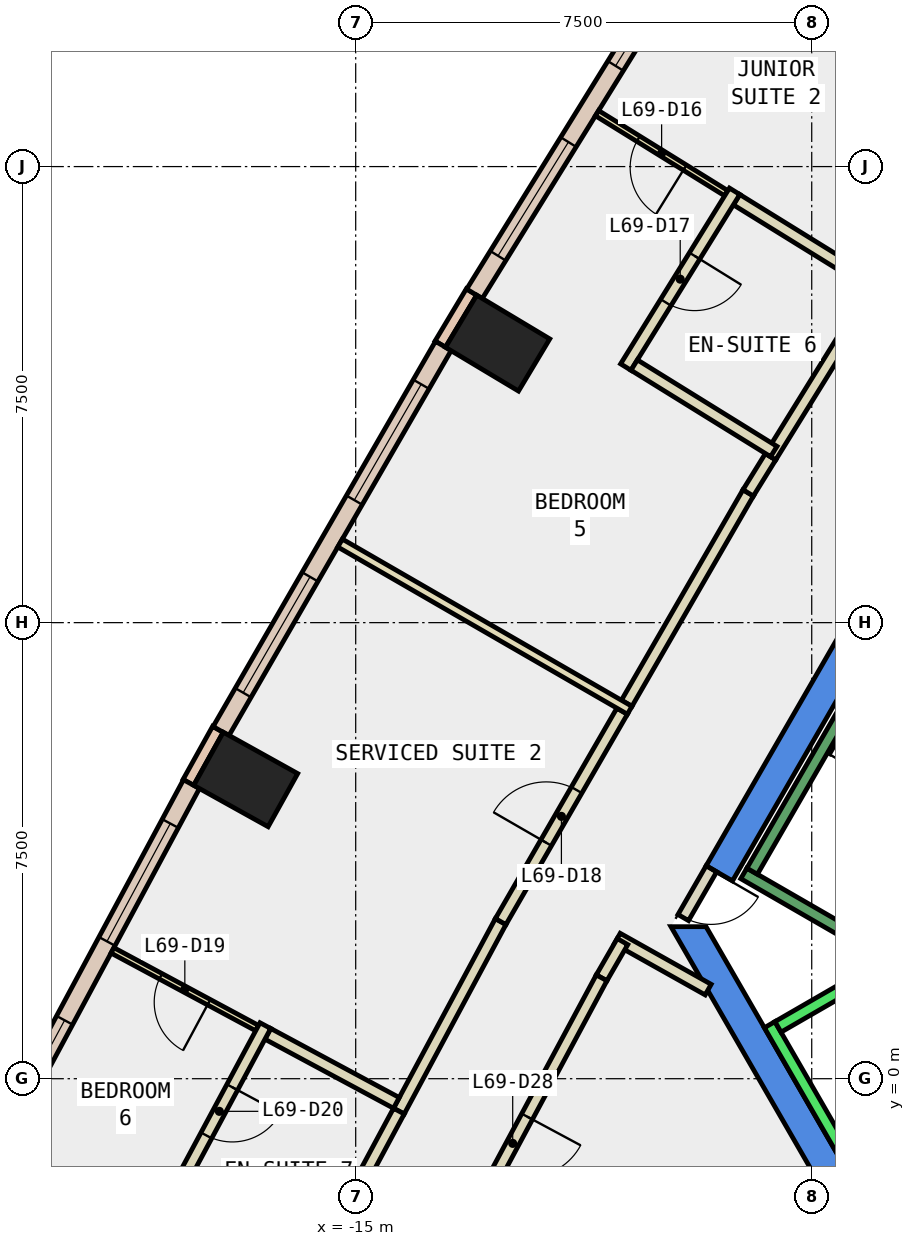
"""IFC4 building model, lengths in metres.
Left out: names, types, materials, properties, quantities, classifications, styles, units other than length and angle.
Written with IfcOpenShell. Run it as: python <this file> out.ifc"""

import sys

from ifc_helpers import new_model, si_unit, direction, frame, frame_2d, origin, origin_2d, place, context, subcontext, project, spatial, polyline, rectangle, outline, extrude, element, fill, save


model = new_model("IFC4")
c1 = context("Model", 3, precision=1e-05, world=origin(), true_north=direction((0.0, 1.0)))
c2 = subcontext(c1, "Body", "Model", "MODEL_VIEW")
j1 = project(units=[si_unit("LENGTHUNIT", "METRE"), si_unit("PLANEANGLEUNIT", "RADIAN")], contexts=[c1])
p1 = place(None, origin())
s1 = spatial("IfcSite", under=j1, at=p1, CompositionType="ELEMENT")
p2 = place(p1, origin())
s2 = spatial("IfcBuilding", under=s1, at=p2, CompositionType="ELEMENT")
p3 = place(p2, frame((0.0, 0.0, 297.2)))
s3 = spatial("IfcBuildingStorey", under=s2, at=p3, CompositionType="ELEMENT", Elevation=297.2)
for number, where, z_axis, x_axis in (
    (1, (-12.666, 12.097, -0.34), (0.0, 0.0, 1.0), (0.514, 0.858, 0.0)),
    (2, (-16.809, 4.921, -0.34), (0.0, 0.0, 1.0), (0.486, 0.874, 0.0)),
):
    element("IfcColumn", number, at=place(p3, frame(where, z_axis=z_axis, x_axis=x_axis)), inside=s3, PredefinedType="COLUMN", context=c2, shape_type="SweptSolid", body=[
        extrude(rectangle(XDim=1.0, YDim=1.4, at=origin_2d()), origin(), (0.0, 0.0, 1.0), 3.6),
    ])
p4 = place(p3, frame((0.0, 0.0, -0.34)))
e3 = element("IfcWall", 3, at=p4, inside=s3, PredefinedType="SHEAR", context=c2, shape_type="SweptSolid", body=[
    extrude(outline(polyline([(-9.236, 3.502), (-8.803, 3.253), (-4.619, 10.5), (-4.907, 11.0), (-9.236, 3.502)])), origin(), (0.0, 0.0, 1.0), 3.6),
])
p5 = place(p3, frame((0.0, 0.0, -0.34)))
e4 = element("IfcWall", 4, at=p5, inside=s3, PredefinedType="SHEAR", context=c2, shape_type="SweptSolid", body=[
    extrude(outline(polyline([(-9.815, 2.5), (-4.907, -6.0), (-4.619, -5.5), (-9.238, 2.5), (-9.815, 2.5)])), origin(), (0.0, 0.0, 1.0), 3.6),
])
for number, where, z_axis, x_axis in (
    (5, (-13.095, 12.938, 0.0), (0.0, 0.0, 1.0), (-0.514, -0.858, 0.0)),
    (6, (-17.266, 5.746, 0.0), (0.0, 0.0, 1.0), (-0.486, -0.874, 0.0)),
):
    element("IfcWall", number, at=place(p3, frame(where, z_axis=z_axis, x_axis=x_axis)), inside=s3, PredefinedType="STANDARD", context=c2, shape_type="SweptSolid", body=[
        extrude(rectangle(XDim=1.0, YDim=0.2, at=frame_2d((0.5, 0.0))), origin(), (0.0, 0.0, 1.0), 3.26),
    ])
p6 = place(p3, frame((-9.18, 19.153, 0.0), z_axis=(0.0, 0.0, 1.0), x_axis=(-0.526409529565, -0.850231149267, 0.0)))
e7 = element("IfcWall", 7, at=p6, inside=s3, PredefinedType="STANDARD", context=c2, shape_type="SweptSolid", body=[
    extrude(rectangle(XDim=7.346, YDim=0.3, at=frame_2d((3.673, 0.0))), origin(), (0.0, 0.0, 1.0), 3.26),
])
p7 = place(p6, frame((0.737, 0.0, 0.9)))
e8 = element("IfcOpeningElement", 8, at=p7, cuts=e7, PredefinedType="OPENING", context=c2, shape_type="SweptSolid", body=[
    extrude(rectangle(XDim=2.2, YDim=2.0, at=frame_2d((1.1, 1.0))), frame((0.0, 0.16, 0.0), z_axis=(0.0, -1.0, 0.0), x_axis=(1.0, 0.0, 0.0)), (0.0, 0.0, 1.0), 0.32),
])
p8 = place(p6, frame((4.41, 0.0, 0.9)))
e9 = element("IfcOpeningElement", 9, at=p8, cuts=e7, PredefinedType="OPENING", context=c2, shape_type="SweptSolid", body=[
    extrude(rectangle(XDim=2.2, YDim=2.0, at=frame_2d((1.1, 1.0))), frame((0.0, 0.16, 0.0), z_axis=(0.0, -1.0, 0.0), x_axis=(1.0, 0.0, 0.0)), (0.0, 0.0, 1.0), 0.32),
])
p9 = place(p3, frame((-13.559, 12.051, 0.0), z_axis=(0.0, 0.0, 1.0), x_axis=(-0.499905472729, -0.866079972252, 0.0)))
e10 = element("IfcWall", 10, at=p9, inside=s3, PredefinedType="STANDARD", context=c2, shape_type="SweptSolid", body=[
    extrude(rectangle(XDim=7.313, YDim=0.3, at=frame_2d((3.657, 0.0))), origin(), (0.0, 0.0, 1.0), 3.26),
])
p10 = place(p9, frame((0.728, 0.0, 0.9)))
e11 = element("IfcOpeningElement", 11, at=p10, cuts=e10, PredefinedType="OPENING", context=c2, shape_type="SweptSolid", body=[
    extrude(rectangle(XDim=2.2, YDim=2.0, at=frame_2d((1.1, 1.0))), frame((0.0, 0.16, 0.0), z_axis=(0.0, -1.0, 0.0), x_axis=(1.0, 0.0, 0.0)), (0.0, 0.0, 1.0), 0.32),
])
p11 = place(p9, frame((4.385, 0.0, 0.9)))
e12 = element("IfcOpeningElement", 12, at=p11, cuts=e10, PredefinedType="OPENING", context=c2, shape_type="SweptSolid", body=[
    extrude(rectangle(XDim=2.2, YDim=2.0, at=frame_2d((1.1, 1.0))), frame((0.0, 0.16, 0.0), z_axis=(0.0, -1.0, 0.0), x_axis=(1.0, 0.0, 0.0)), (0.0, 0.0, 1.0), 0.32),
])
p12 = place(p3, frame((-17.701, 4.845, 0.0), z_axis=(0.0, 0.0, 1.0), x_axis=(-0.473225522632, -0.880941317415, 0.0)))
e13 = element("IfcWall", 13, at=p12, inside=s3, PredefinedType="STANDARD", context=c2, shape_type="SweptSolid", body=[
    extrude(rectangle(XDim=7.345, YDim=0.3, at=frame_2d((3.673, 0.0))), origin(), (0.0, 0.0, 1.0), 3.26),
])
p13 = place(p12, frame((0.736, 0.0, 0.9)))
e14 = element("IfcOpeningElement", 14, at=p13, cuts=e13, PredefinedType="OPENING", context=c2, shape_type="SweptSolid", body=[
    extrude(rectangle(XDim=2.2, YDim=2.0, at=frame_2d((1.1, 1.0))), frame((0.0, 0.16, 0.0), z_axis=(0.0, -1.0, 0.0), x_axis=(1.0, 0.0, 0.0)), (0.0, 0.0, 1.0), 0.32),
])
p14 = place(p12, frame((4.409, 0.0, 0.9)))
e15 = element("IfcOpeningElement", 15, at=p14, cuts=e13, PredefinedType="OPENING", context=c2, shape_type="SweptSolid", body=[
    extrude(rectangle(XDim=2.2, YDim=2.0, at=frame_2d((1.1, 1.0))), frame((0.0, 0.16, 0.0), z_axis=(0.0, -1.0, 0.0), x_axis=(1.0, 0.0, 0.0)), (0.0, 0.0, 1.0), 0.32),
])
p15 = place(p3, frame((-9.203, 1.465, 0.0), z_axis=(0.0, 0.0, 1.0), x_axis=(-0.872243753731, 0.489071399775, 0.0)))
e16 = element("IfcWall", 16, at=p15, inside=s3, PredefinedType="PARTITIONING", context=c2, shape_type="SweptSolid", body=[
    extrude(rectangle(XDim=1.715, YDim=0.2, at=frame_2d((0.858, 0.0))), origin(), (0.0, 0.0, 1.0), 3.26),
])
p16 = place(p3, frame((-10.612, 2.255, 0.0), z_axis=(0.0, 0.0, 1.0), x_axis=(-0.499916971989, -0.866073334723, 0.0)))
e17 = element("IfcWall", 17, at=p16, inside=s3, PredefinedType="PARTITIONING", context=c2, shape_type="SweptSolid", body=[
    extrude(rectangle(XDim=0.688, YDim=0.2, at=frame_2d((0.344, 0.0))), origin(), (0.0, 0.0, 1.0), 3.26),
])
p17 = place(p3, frame((-10.956, 1.659, 0.0), z_axis=(0.0, 0.0, 1.0), x_axis=(-0.473095976848, -0.881010894762, 0.0)))
e18 = element("IfcWall", 18, at=p17, inside=s3, PredefinedType="PARTITIONING", context=c2, shape_type="SweptSolid", body=[
    extrude(rectangle(XDim=6.18, YDim=0.2, at=frame_2d((3.09, 0.0))), origin(), (0.0, 0.0, 1.0), 3.26),
])
p18 = place(p17, frame((2.59, 0.0, 0.0)))
e19 = element("IfcOpeningElement", 19, at=p18, cuts=e18, PredefinedType="OPENING", context=c2, shape_type="SweptSolid", body=[
    extrude(rectangle(XDim=1.0, YDim=2.1, at=frame_2d((0.5, 1.05))), frame((0.0, 0.11, 0.0), z_axis=(0.0, -1.0, 0.0), x_axis=(1.0, 0.0, 0.0)), (0.0, 0.0, 1.0), 0.22),
])
p19 = place(p3, frame((-10.543, 6.174, 0.0), z_axis=(0.0, 0.0, 1.0), x_axis=(0.50008212199, 0.86597798544, 0.0)))
e20 = element("IfcWall", 20, at=p19, inside=s3, PredefinedType="PARTITIONING", context=c2, shape_type="SweptSolid", body=[
    extrude(rectangle(XDim=3.995, YDim=0.2, at=frame_2d((1.998, 0.0))), origin(), (0.0, 0.0, 1.0), 3.26),
])
p20 = place(p3, frame((-8.545, 9.634, 0.0), z_axis=(0.0, 0.0, 1.0), x_axis=(0.52594604986, 0.85051793199, 0.0)))
e21 = element("IfcWall", 21, at=p20, inside=s3, PredefinedType="PARTITIONING", context=c2, shape_type="SweptSolid", body=[
    extrude(rectangle(XDim=0.699, YDim=0.2, at=frame_2d((0.35, 0.0))), origin(), (0.0, 0.0, 1.0), 3.26),
])
p21 = place(p3, frame((-8.177, 10.229, 0.0), z_axis=(0.0, 0.0, 1.0), x_axis=(0.526504295939, 0.850172468595, 0.0)))
e22 = element("IfcWall", 22, at=p21, inside=s3, PredefinedType="PARTITIONING", context=c2, shape_type="SweptSolid", body=[
    extrude(rectangle(XDim=3.2, YDim=0.2, at=frame_2d((1.6, 0.0))), origin(), (0.0, 0.0, 1.0), 3.26),
])
p22 = place(p3, frame((-14.29, -0.533, 0.0), z_axis=(0.0, 0.0, 1.0), x_axis=(0.473161350875, 0.880975786295, 0.0)))
e23 = element("IfcWall", 23, at=p22, inside=s3, PredefinedType="PARTITIONING", context=c2, shape_type="SweptSolid", body=[
    extrude(rectangle(XDim=3.538, YDim=0.2, at=frame_2d((1.769, 0.0))), origin(), (0.0, 0.0, 1.0), 3.26),
])
p23 = place(p3, frame((-12.616, 2.584, 0.0), z_axis=(0.0, 0.0, 1.0), x_axis=(0.50008212199, 0.86597798544, 0.0)))
e24 = element("IfcWall", 24, at=p23, inside=s3, PredefinedType="PARTITIONING", context=c2, shape_type="SweptSolid", body=[
    extrude(rectangle(XDim=3.995, YDim=0.2, at=frame_2d((1.998, 0.0))), origin(), (0.0, 0.0, 1.0), 3.26),
])
p24 = place(p23, frame((1.498, 0.0, 0.0)))
e25 = element("IfcOpeningElement", 25, at=p24, cuts=e24, PredefinedType="OPENING", context=c2, shape_type="SweptSolid", body=[
    extrude(rectangle(XDim=1.0, YDim=2.1, at=frame_2d((0.5, 1.05))), frame((0.0, 0.11, 0.0), z_axis=(0.0, -1.0, 0.0), x_axis=(1.0, 0.0, 0.0)), (0.0, 0.0, 1.0), 0.22),
])
p25 = place(p3, frame((-15.71, -3.176, 0.0), z_axis=(0.0, 0.0, 1.0), x_axis=(0.473255284848, 0.880925329051, 0.0)))
e26 = element("IfcWall", 26, at=p25, inside=s3, PredefinedType="PARTITIONING", context=c2, shape_type="SweptSolid", body=[
    extrude(rectangle(XDim=3.0, YDim=0.2, at=frame_2d((1.5, 0.0))), origin(), (0.0, 0.0, 1.0), 3.26),
])
p26 = place(p3, frame((-4.445, 16.068, 0.0), z_axis=(0.0, 0.0, 1.0), x_axis=(-0.785872006963, 0.618389188677, 0.0)))
e27 = element("IfcWall", 27, at=p26, inside=s3, PredefinedType="PARTITIONING", context=c2, shape_type="SweptSolid", body=[
    extrude(rectangle(XDim=4.216, YDim=0.15, at=frame_2d((2.108, 0.0))), origin(), (0.0, 0.0, 1.0), 3.26),
])
p27 = place(p3, frame((-8.906, 14.562, 0.0), z_axis=(0.0, 0.0, 1.0), x_axis=(-0.850186034224, 0.526482390219, 0.0)))
e28 = element("IfcWall", 28, at=p27, inside=s3, PredefinedType="PARTITIONING", context=c2, shape_type="SweptSolid", body=[
    extrude(rectangle(XDim=2.5, YDim=0.1, at=frame_2d((1.25, 0.0))), origin(), (0.0, 0.0, 1.0), 3.26),
])
p28 = place(p27, frame((0.8, 0.0, 0.0)))
e29 = element("IfcOpeningElement", 29, at=p28, cuts=e28, PredefinedType="OPENING", context=c2, shape_type="SweptSolid", body=[
    extrude(rectangle(XDim=0.9, YDim=2.1, at=frame_2d((0.45, 1.05))), frame((0.0, 0.06, 0.0), z_axis=(0.0, -1.0, 0.0), x_axis=(1.0, 0.0, 0.0)), (0.0, 0.0, 1.0), 0.12),
])
p29 = place(p3, frame((-6.525, 13.088, 0.0), z_axis=(0.0, 0.0, 1.0), x_axis=(-0.850379182329, 0.526170358592, 0.0)))
e30 = element("IfcWall", 30, at=p29, inside=s3, PredefinedType="PARTITIONING", context=c2, shape_type="SweptSolid", body=[
    extrude(rectangle(XDim=2.6, YDim=0.2, at=frame_2d((1.3, 0.0))), origin(), (0.0, 0.0, 1.0), 3.26),
])
p30 = place(p3, frame((-8.768, 14.594, 0.0), z_axis=(0.0, 0.0, 1.0), x_axis=(-0.526418877713, -0.850225361412, 0.0)))
e31 = element("IfcWall", 31, at=p30, inside=s3, PredefinedType="PARTITIONING", context=c2, shape_type="SweptSolid", body=[
    extrude(rectangle(XDim=3.4, YDim=0.2, at=frame_2d((1.7, 0.0))), origin(), (0.0, 0.0, 1.0), 3.26),
])
p31 = place(p30, frame((1.25, 0.0, 0.0)))
e32 = element("IfcOpeningElement", 32, at=p31, cuts=e31, PredefinedType="OPENING", context=c2, shape_type="SweptSolid", body=[
    extrude(rectangle(XDim=0.9, YDim=2.1, at=frame_2d((0.45, 1.05))), frame((0.0, 0.11, 0.0), z_axis=(0.0, -1.0, 0.0), x_axis=(1.0, 0.0, 0.0)), (0.0, 0.0, 1.0), 0.22),
])
p32 = place(p3, frame((-10.42, 11.736, 0.0), z_axis=(0.0, 0.0, 1.0), x_axis=(0.850124477172, -0.52658178217, 0.0)))
e33 = element("IfcWall", 33, at=p32, inside=s3, PredefinedType="PARTITIONING", context=c2, shape_type="SweptSolid", body=[
    extrude(rectangle(XDim=2.701, YDim=0.2, at=frame_2d((1.35, 0.0))), origin(), (0.0, 0.0, 1.0), 3.26),
])
p33 = place(p3, frame((-10.494, 6.059, 0.0), z_axis=(0.0, 0.0, 1.0), x_axis=(-0.866027397988, 0.499996545922, 0.0)))
e34 = element("IfcWall", 34, at=p33, inside=s3, PredefinedType="PARTITIONING", context=c2, shape_type="SweptSolid", body=[
    extrude(rectangle(XDim=5.5, YDim=0.15, at=frame_2d((2.75, 0.0))), origin(), (0.0, 0.0, 1.0), 3.26),
])
p34 = place(p3, frame((-16.621, 0.832, 0.0), z_axis=(0.0, 0.0, 1.0), x_axis=(-0.880914863524, 0.47327476504, 0.0)))
e35 = element("IfcWall", 35, at=p34, inside=s3, PredefinedType="PARTITIONING", context=c2, shape_type="SweptSolid", body=[
    extrude(rectangle(XDim=2.7, YDim=0.1, at=frame_2d((1.35, 0.0))), origin(), (0.0, 0.0, 1.0), 3.26),
])
p35 = place(p34, frame((0.9, 0.0, 0.0)))
e36 = element("IfcOpeningElement", 36, at=p35, cuts=e35, PredefinedType="OPENING", context=c2, shape_type="SweptSolid", body=[
    extrude(rectangle(XDim=0.9, YDim=2.1, at=frame_2d((0.45, 1.05))), frame((0.0, 0.06, 0.0), z_axis=(0.0, -1.0, 0.0), x_axis=(1.0, 0.0, 0.0)), (0.0, 0.0, 1.0), 0.12),
])
p36 = place(p3, frame((-14.331, -0.398, 0.0), z_axis=(0.0, 0.0, 1.0), x_axis=(-0.880875830026, 0.473347411608, 0.0)))
e37 = element("IfcWall", 37, at=p36, inside=s3, PredefinedType="PARTITIONING", context=c2, shape_type="SweptSolid", body=[
    extrude(rectangle(XDim=2.4, YDim=0.2, at=frame_2d((1.2, 0.0))), origin(), (0.0, 0.0, 1.0), 3.26),
])
p37 = place(p3, frame((-16.486, 0.873, 0.0), z_axis=(0.0, 0.0, 1.0), x_axis=(-0.473116768279, -0.88099972961, 0.0)))
e38 = element("IfcWall", 38, at=p37, inside=s3, PredefinedType="PARTITIONING", context=c2, shape_type="SweptSolid", body=[
    extrude(rectangle(XDim=3.2, YDim=0.2, at=frame_2d((1.6, 0.0))), origin(), (0.0, 0.0, 1.0), 3.26),
])
p38 = place(p37, frame((1.15, 0.0, 0.0)))
e39 = element("IfcOpeningElement", 39, at=p38, cuts=e38, PredefinedType="OPENING", context=c2, shape_type="SweptSolid", body=[
    extrude(rectangle(XDim=0.9, YDim=2.1, at=frame_2d((0.45, 1.05))), frame((0.0, 0.11, 0.0), z_axis=(0.0, -1.0, 0.0), x_axis=(1.0, 0.0, 0.0)), (0.0, 0.0, 1.0), 0.22),
])
p39 = place(p3, frame((-9.15, 3.452, 0.0), z_axis=(0.0, 0.0, 1.0), x_axis=(-0.500079945886, -0.865979242085, 0.0)))
e40 = element("IfcWall", 40, at=p39, inside=s3, PredefinedType="PARTITIONING", context=c2, shape_type="SweptSolid", body=[
    extrude(rectangle(XDim=0.926, YDim=0.2, at=frame_2d((0.463, 0.0))), origin(), (0.0, 0.0, 1.0), 2.4),
])
p40 = place(p39, frame((0.017, 0.0, 0.0)))
e41 = element("IfcOpeningElement", 41, at=p40, cuts=e40, PredefinedType="OPENING", context=c2, shape_type="SweptSolid", body=[
    extrude(rectangle(XDim=0.9, YDim=2.1, at=frame_2d((0.45, 1.05))), frame((0.0, 0.11, 0.0), z_axis=(0.0, -1.0, 0.0), x_axis=(1.0, 0.0, 0.0)), (0.0, 0.0, 1.0), 0.22),
])
p41 = place(p3, frame((-8.192, 0.888, 0.0), z_axis=(0.0, 0.0, 1.0), x_axis=(0.500034260056, -0.866005622828, 0.0)))
e42 = element("IfcWall", 42, at=p41, inside=s3, PredefinedType="STANDARD", context=c2, shape_type="SweptSolid", body=[
    extrude(rectangle(XDim=5.399, YDim=0.2, at=frame_2d((2.7, 0.0))), origin(), (0.0, 0.0, 1.0), 3.26),
])
p42 = place(p3, frame((-5.977, 2.052, 0.0), z_axis=(0.0, 0.0, 1.0), x_axis=(-0.865973769406, -0.500089422704, 0.0)))
e43 = element("IfcWall", 43, at=p42, inside=s3, PredefinedType="STANDARD", context=c2, shape_type="SweptSolid", body=[
    extrude(rectangle(XDim=2.399, YDim=0.2, at=frame_2d((1.2, 0.0))), origin(), (0.0, 0.0, 1.0), 3.26),
])
p43 = place(p3, frame((-6.25, 2.01, 0.0), z_axis=(0.0, 0.0, 1.0), x_axis=(-0.86611865017, 0.499838457731, 0.0)))
e44 = element("IfcWall", 44, at=p43, inside=s3, PredefinedType="STANDARD", context=c2, shape_type="SweptSolid", body=[
    extrude(rectangle(XDim=2.733, YDim=0.2, at=frame_2d((1.366, 0.0))), origin(), (0.0, 0.0, 1.0), 3.26),
])
p44 = place(p3, frame((-5.03, 9.388, 0.0), z_axis=(0.0, 0.0, 1.0), x_axis=(-0.499978703459, -0.866037698999, 0.0)))
e45 = element("IfcWall", 45, at=p44, inside=s3, PredefinedType="STANDARD", context=c2, shape_type="SweptSolid", body=[
    extrude(rectangle(XDim=6.9, YDim=0.2, at=frame_2d((3.45, 0.0))), origin(), (0.0, 0.0, 1.0), 3.26),
])
p45 = place(p7, origin())
e46 = element("IfcWindow", 46, at=p45, inside=s3, PartitioningType="SINGLE_PANEL", PredefinedType="WINDOW", context=c2, shape_type="SweptSolid", body=[
    extrude(rectangle(XDim=2.2, YDim=2.0, at=frame_2d((1.1, 1.0))), frame((0.0, 0.03, 0.0), z_axis=(0.0, -1.0, 0.0), x_axis=(1.0, 0.0, 0.0)), (0.0, 0.0, 1.0), 0.06),
])
fill(e8, e46)
p46 = place(p8, origin())
e47 = element("IfcWindow", 47, at=p46, inside=s3, PartitioningType="SINGLE_PANEL", PredefinedType="WINDOW", context=c2, shape_type="SweptSolid", body=[
    extrude(rectangle(XDim=2.2, YDim=2.0, at=frame_2d((1.1, 1.0))), frame((0.0, 0.03, 0.0), z_axis=(0.0, -1.0, 0.0), x_axis=(1.0, 0.0, 0.0)), (0.0, 0.0, 1.0), 0.06),
])
fill(e9, e47)
p47 = place(p10, origin())
e48 = element("IfcWindow", 48, at=p47, inside=s3, PartitioningType="SINGLE_PANEL", PredefinedType="WINDOW", context=c2, shape_type="SweptSolid", body=[
    extrude(rectangle(XDim=2.2, YDim=2.0, at=frame_2d((1.1, 1.0))), frame((0.0, 0.03, 0.0), z_axis=(0.0, -1.0, 0.0), x_axis=(1.0, 0.0, 0.0)), (0.0, 0.0, 1.0), 0.06),
])
fill(e11, e48)
p48 = place(p11, origin())
e49 = element("IfcWindow", 49, at=p48, inside=s3, PartitioningType="SINGLE_PANEL", PredefinedType="WINDOW", context=c2, shape_type="SweptSolid", body=[
    extrude(rectangle(XDim=2.2, YDim=2.0, at=frame_2d((1.1, 1.0))), frame((0.0, 0.03, 0.0), z_axis=(0.0, -1.0, 0.0), x_axis=(1.0, 0.0, 0.0)), (0.0, 0.0, 1.0), 0.06),
])
fill(e12, e49)
p49 = place(p13, origin())
e50 = element("IfcWindow", 50, at=p49, inside=s3, PartitioningType="SINGLE_PANEL", PredefinedType="WINDOW", context=c2, shape_type="SweptSolid", body=[
    extrude(rectangle(XDim=2.2, YDim=2.0, at=frame_2d((1.1, 1.0))), frame((0.0, 0.03, 0.0), z_axis=(0.0, -1.0, 0.0), x_axis=(1.0, 0.0, 0.0)), (0.0, 0.0, 1.0), 0.06),
])
fill(e14, e50)
p50 = place(p14, origin())
e51 = element("IfcWindow", 51, at=p50, inside=s3, PartitioningType="SINGLE_PANEL", PredefinedType="WINDOW", context=c2, shape_type="SweptSolid", body=[
    extrude(rectangle(XDim=2.2, YDim=2.0, at=frame_2d((1.1, 1.0))), frame((0.0, 0.03, 0.0), z_axis=(0.0, -1.0, 0.0), x_axis=(1.0, 0.0, 0.0)), (0.0, 0.0, 1.0), 0.06),
])
fill(e15, e51)
p51 = place(p28, origin())
e52 = element("IfcDoor", 52, at=p51, inside=s3, OperationType="SINGLE_SWING_LEFT", PredefinedType="DOOR", context=c2, shape_type="SweptSolid", body=[
    extrude(rectangle(XDim=0.9, YDim=2.1, at=frame_2d((0.45, 1.05))), frame((0.0, 0.025, 0.0), z_axis=(0.0, -1.0, 0.0), x_axis=(1.0, 0.0, 0.0)), (0.0, 0.0, 1.0), 0.05),
])
fill(e29, e52)
p52 = place(p31, origin())
e53 = element("IfcDoor", 53, at=p52, inside=s3, OperationType="SINGLE_SWING_LEFT", PredefinedType="DOOR", context=c2, shape_type="SweptSolid", body=[
    extrude(rectangle(XDim=0.9, YDim=2.1, at=frame_2d((0.45, 1.05))), frame((0.0, 0.025, 0.0), z_axis=(0.0, -1.0, 0.0), x_axis=(1.0, 0.0, 0.0)), (0.0, 0.0, 1.0), 0.05),
])
fill(e32, e53)
p53 = place(p24, origin())
e54 = element("IfcDoor", 54, at=p53, inside=s3, OperationType="SINGLE_SWING_LEFT", PredefinedType="DOOR", context=c2, shape_type="SweptSolid", body=[
    extrude(rectangle(XDim=1.0, YDim=2.1, at=frame_2d((0.5, 1.05))), frame((0.0, 0.025, 0.0), z_axis=(0.0, -1.0, 0.0), x_axis=(1.0, 0.0, 0.0)), (0.0, 0.0, 1.0), 0.05),
])
fill(e25, e54)
p54 = place(p35, origin())
e55 = element("IfcDoor", 55, at=p54, inside=s3, OperationType="SINGLE_SWING_LEFT", PredefinedType="DOOR", context=c2, shape_type="SweptSolid", body=[
    extrude(rectangle(XDim=0.9, YDim=2.1, at=frame_2d((0.45, 1.05))), frame((0.0, 0.025, 0.0), z_axis=(0.0, -1.0, 0.0), x_axis=(1.0, 0.0, 0.0)), (0.0, 0.0, 1.0), 0.05),
])
fill(e36, e55)
p55 = place(p38, origin())
e56 = element("IfcDoor", 56, at=p55, inside=s3, OperationType="SINGLE_SWING_LEFT", PredefinedType="DOOR", context=c2, shape_type="SweptSolid", body=[
    extrude(rectangle(XDim=0.9, YDim=2.1, at=frame_2d((0.45, 1.05))), frame((0.0, 0.025, 0.0), z_axis=(0.0, -1.0, 0.0), x_axis=(1.0, 0.0, 0.0)), (0.0, 0.0, 1.0), 0.05),
])
fill(e39, e56)
p56 = place(p18, origin())
e57 = element("IfcDoor", 57, at=p56, inside=s3, OperationType="SINGLE_SWING_LEFT", PredefinedType="DOOR", context=c2, shape_type="SweptSolid", body=[
    extrude(rectangle(XDim=1.0, YDim=2.1, at=frame_2d((0.5, 1.05))), frame((0.0, 0.025, 0.0), z_axis=(0.0, -1.0, 0.0), x_axis=(1.0, 0.0, 0.0)), (0.0, 0.0, 1.0), 0.05),
])
fill(e19, e57)
p57 = place(p40, origin())
e58 = element("IfcDoor", 58, at=p57, inside=s3, OperationType="SINGLE_SWING_LEFT", PredefinedType="DOOR", context=c2, shape_type="SweptSolid", body=[
    extrude(rectangle(XDim=0.9, YDim=2.1, at=frame_2d((0.45, 1.05))), frame((0.0, 0.025, 0.0), z_axis=(0.0, -1.0, 0.0), x_axis=(1.0, 0.0, 0.0)), (0.0, 0.0, 1.0), 0.05),
])
fill(e41, e58)
save(model, sys.argv[1])
